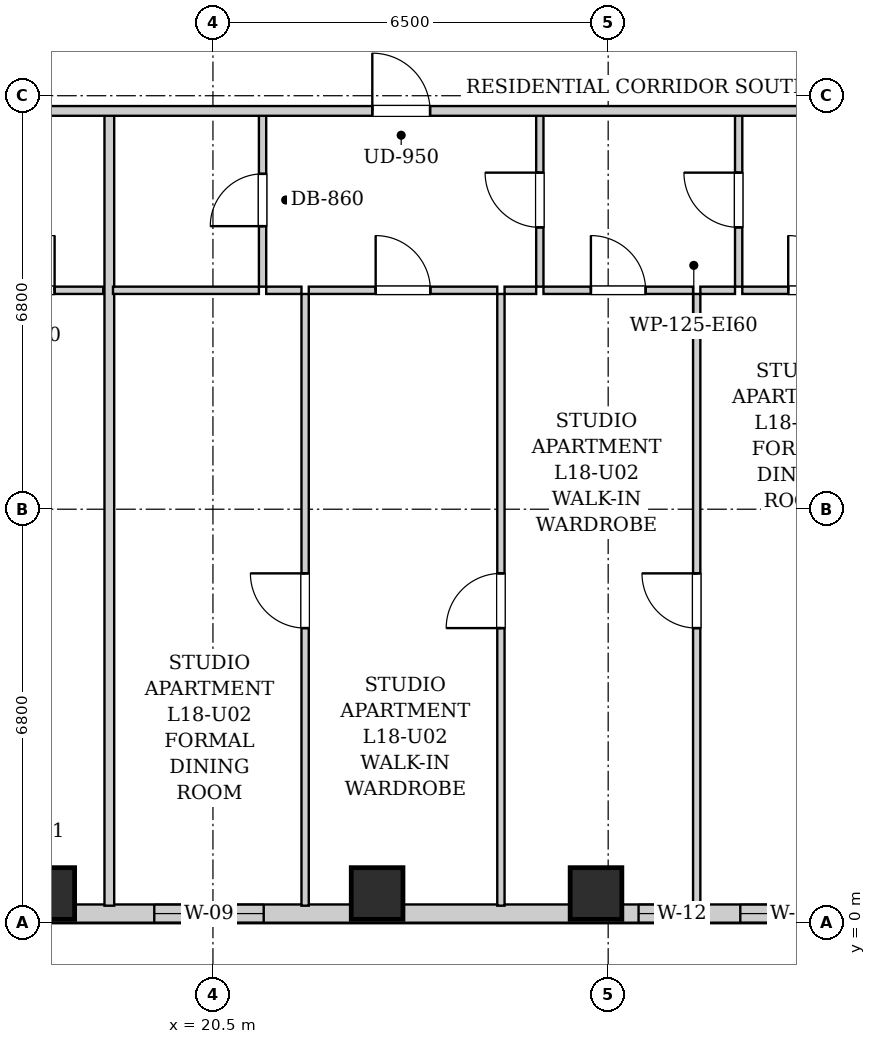
"""IFC4 building model, lengths in metres.
Left out: names, types, materials, properties, quantities, classifications, styles, units other than length and angle.
Written with IfcOpenShell. Run it as: python <this file> out.ifc"""

import sys

from ifc_helpers import new_model, si_unit, direction, frame, frame_2d, origin, origin_2d, place, context, subcontext, project, spatial, rectangle, extrude, element, fill, save


model = new_model("IFC4")
c1 = context("Model", 3, precision=1e-05, world=origin(), true_north=direction((0.0, 1.0)))
c2 = subcontext(c1, "Body", "Model", "MODEL_VIEW")
j1 = project(units=[si_unit("LENGTHUNIT", "METRE"), si_unit("PLANEANGLEUNIT", "RADIAN")], contexts=[c1])
p1 = place(None, origin())
s1 = spatial("IfcSite", under=j1, at=p1, CompositionType="ELEMENT")
p2 = place(p1, origin())
s2 = spatial("IfcBuilding", under=s1, at=p2, CompositionType="ELEMENT")
p3 = place(p2, frame((0.0, 0.0, 67.4)))
s3 = spatial("IfcBuildingStorey", under=s2, at=p3, CompositionType="ELEMENT", Elevation=67.4)
for number, where, z_axis, x_axis in (
    (1, (17.8, 0.48, 0.0), (0.0, 0.0, 1.0), (1.0, 0.0, 0.0)),
    (2, (23.2, 0.48, 0.0), (0.0, 0.0, 1.0), (1.0, 0.0, 0.0)),
    (3, (26.8, 0.48, 0.0), (0.0, 0.0, 1.0), (1.0, 0.0, 0.0)),
):
    element("IfcColumn", number, at=place(p3, frame(where, z_axis=z_axis, x_axis=x_axis)), inside=s3, PredefinedType="COLUMN", context=c2, shape_type="SweptSolid", body=[
        extrude(rectangle(XDim=0.85, YDim=0.85, at=origin_2d()), origin(), (0.0, 0.0, 1.0), 3.2),
    ])
p4 = place(p3, frame((44.0, 0.15, 0.0), z_axis=(0.0, 0.0, 1.0), x_axis=(-1.0, 0.0, 0.0)))
e4 = element("IfcWall", 4, at=p4, inside=s3, PredefinedType="SOLIDWALL", context=c2, shape_type="SweptSolid", body=[
    extrude(rectangle(XDim=26.35, YDim=0.3, at=frame_2d((13.175, 0.0))), origin(), (0.0, 0.0, 1.0), 1.915),
])
p5 = place(p4, frame((22.665, 0.0, 0.55)))
e5 = element("IfcOpeningElement", 5, at=p5, cuts=e4, PredefinedType="OPENING", context=c2, shape_type="SweptSolid", body=[
    extrude(rectangle(XDim=1.8, YDim=1.2, at=frame_2d((0.9, 0.6))), frame((0.0, 0.16, 0.0), z_axis=(0.0, -1.0, 0.0), x_axis=(1.0, 0.0, 0.0)), (0.0, 0.0, 1.0), 0.32),
])
p6 = place(p4, frame((15.82, 0.0, 0.55)))
e6 = element("IfcOpeningElement", 6, at=p6, cuts=e4, PredefinedType="OPENING", context=c2, shape_type="SweptSolid", body=[
    extrude(rectangle(XDim=0.68, YDim=1.2, at=frame_2d((0.34, 0.6))), frame((0.0, 0.16, 0.0), z_axis=(0.0, -1.0, 0.0), x_axis=(1.0, 0.0, 0.0)), (0.0, 0.0, 1.0), 0.32),
])
p7 = place(p4, frame((13.027, 0.0, 0.55)))
e7 = element("IfcOpeningElement", 7, at=p7, cuts=e4, PredefinedType="OPENING", context=c2, shape_type="SweptSolid", body=[
    extrude(rectangle(XDim=1.8, YDim=1.2, at=frame_2d((0.9, 0.6))), frame((0.0, 0.16, 0.0), z_axis=(0.0, -1.0, 0.0), x_axis=(1.0, 0.0, 0.0)), (0.0, 0.0, 1.0), 0.32),
])
p8 = place(p4, frame((9.365, 0.0, 0.55)))
e8 = element("IfcOpeningElement", 8, at=p8, cuts=e4, PredefinedType="OPENING", context=c2, shape_type="SweptSolid", body=[
    extrude(rectangle(XDim=0.85, YDim=1.2, at=frame_2d((0.425, 0.6))), frame((0.0, 0.16, 0.0), z_axis=(0.0, -1.0, 0.0), x_axis=(1.0, 0.0, 0.0)), (0.0, 0.0, 1.0), 0.32),
])
p9 = place(p4, frame((6.553, 0.0, 0.55)))
e9 = element("IfcOpeningElement", 9, at=p9, cuts=e4, PredefinedType="OPENING", context=c2, shape_type="SweptSolid", body=[
    extrude(rectangle(XDim=1.8, YDim=1.2, at=frame_2d((0.9, 0.6))), frame((0.0, 0.16, 0.0), z_axis=(0.0, -1.0, 0.0), x_axis=(1.0, 0.0, 0.0)), (0.0, 0.0, 1.0), 0.32),
])
p10 = place(p4, frame((2.262, 0.0, 0.55)))
e10 = element("IfcOpeningElement", 10, at=p10, cuts=e4, PredefinedType="OPENING", context=c2, shape_type="SweptSolid", body=[
    extrude(rectangle(XDim=1.8, YDim=1.2, at=frame_2d((0.9, 0.6))), frame((0.0, 0.16, 0.0), z_axis=(0.0, -1.0, 0.0), x_axis=(1.0, 0.0, 0.0)), (0.0, 0.0, 1.0), 0.32),
])
p11 = place(p3, frame((16.196, 10.4, 0.0), z_axis=(0.0, 0.0, 1.0), x_axis=(1.0, 0.0, 0.0)))
e11 = element("IfcWall", 11, at=p11, inside=s3, PredefinedType="PARTITIONING", context=c2, shape_type="SweptSolid", body=[
    extrude(rectangle(XDim=2.5, YDim=0.12, at=frame_2d((1.25, 0.0))), origin(), (0.0, 0.0, 1.0), 2.88),
])
p12 = place(p11, frame((0.8, 0.0, 0.0)))
e12 = element("IfcOpeningElement", 12, at=p12, cuts=e11, PredefinedType="OPENING", context=c2, shape_type="SweptSolid", body=[
    extrude(rectangle(XDim=0.9, YDim=2.05, at=frame_2d((0.45, 1.025))), frame((0.0, 0.07, 0.0), z_axis=(0.0, -1.0, 0.0), x_axis=(1.0, 0.0, 0.0)), (0.0, 0.0, 1.0), 0.14),
])
p13 = place(p3, frame((18.796, 0.28, 0.0), z_axis=(0.0, 0.0, 1.0), x_axis=(0.0, 1.0, 0.0)))
e13 = element("IfcWall", 13, at=p13, inside=s3, PredefinedType="PARTITIONING", context=c2, shape_type="SweptSolid", body=[
    extrude(rectangle(XDim=13.03, YDim=0.16, at=frame_2d((6.515, 0.0))), origin(), (0.0, 0.0, 1.0), 2.88),
])
p14 = place(p3, frame((21.316, 10.46, 0.0), z_axis=(0.0, 0.0, 1.0), x_axis=(0.0, 1.0, 0.0)))
e14 = element("IfcWall", 14, at=p14, inside=s3, PredefinedType="PARTITIONING", context=c2, shape_type="SweptSolid", body=[
    extrude(rectangle(XDim=2.85, YDim=0.12, at=frame_2d((1.425, 0.0))), origin(), (0.0, 0.0, 1.0), 2.88),
])
p15 = place(p14, frame((0.995, 0.0, 0.0)))
e15 = element("IfcOpeningElement", 15, at=p15, cuts=e14, PredefinedType="OPENING", context=c2, shape_type="SweptSolid", body=[
    extrude(rectangle(XDim=0.86, YDim=2.05, at=frame_2d((0.43, 1.025))), frame((0.0, 0.07, 0.0), z_axis=(0.0, -1.0, 0.0), x_axis=(1.0, 0.0, 0.0)), (0.0, 0.0, 1.0), 0.14),
])
p16 = place(p3, frame((18.856, 10.4, 0.0), z_axis=(0.0, 0.0, 1.0), x_axis=(1.0, 0.0, 0.0)))
e16 = element("IfcWall", 16, at=p16, inside=s3, PredefinedType="PARTITIONING", context=c2, shape_type="SweptSolid", body=[
    extrude(rectangle(XDim=2.4, YDim=0.12, at=frame_2d((1.2, 0.0))), origin(), (0.0, 0.0, 1.0), 2.88),
])
p17 = place(p3, frame((25.876, 10.46, 0.0), z_axis=(0.0, 0.0, 1.0), x_axis=(0.0, 1.0, 0.0)))
e17 = element("IfcWall", 17, at=p17, inside=s3, PredefinedType="PARTITIONING", context=c2, shape_type="SweptSolid", body=[
    extrude(rectangle(XDim=2.85, YDim=0.12, at=frame_2d((1.425, 0.0))), origin(), (0.0, 0.0, 1.0), 2.88),
])
p18 = place(p17, frame((0.975, 0.0, 0.0)))
e18 = element("IfcOpeningElement", 18, at=p18, cuts=e17, PredefinedType="OPENING", context=c2, shape_type="SweptSolid", body=[
    extrude(rectangle(XDim=0.9, YDim=2.05, at=frame_2d((0.45, 1.025))), frame((0.0, 0.07, 0.0), z_axis=(0.0, -1.0, 0.0), x_axis=(1.0, 0.0, 0.0)), (0.0, 0.0, 1.0), 0.14),
])
p19 = place(p3, frame((21.376, 10.4, 0.0), z_axis=(0.0, 0.0, 1.0), x_axis=(1.0, 0.0, 0.0)))
e19 = element("IfcWall", 19, at=p19, inside=s3, PredefinedType="PARTITIONING", context=c2, shape_type="SweptSolid", body=[
    extrude(rectangle(XDim=0.58, YDim=0.12, at=frame_2d((0.29, 0.0))), origin(), (0.0, 0.0, 1.0), 2.88),
])
p20 = place(p3, frame((22.076, 10.4, 0.0), z_axis=(0.0, 0.0, 1.0), x_axis=(1.0, 0.0, 0.0)))
e20 = element("IfcWall", 20, at=p20, inside=s3, PredefinedType="PARTITIONING", context=c2, shape_type="SweptSolid", body=[
    extrude(rectangle(XDim=3.1, YDim=0.12, at=frame_2d((1.55, 0.0))), origin(), (0.0, 0.0, 1.0), 2.88),
])
p21 = place(p20, frame((1.1, 0.0, 0.0)))
e21 = element("IfcOpeningElement", 21, at=p21, cuts=e20, PredefinedType="OPENING", context=c2, shape_type="SweptSolid", body=[
    extrude(rectangle(XDim=0.9, YDim=2.05, at=frame_2d((0.45, 1.025))), frame((0.0, 0.07, 0.0), z_axis=(0.0, -1.0, 0.0), x_axis=(1.0, 0.0, 0.0)), (0.0, 0.0, 1.0), 0.14),
])
p22 = place(p3, frame((25.296, 10.4, 0.0), z_axis=(0.0, 0.0, 1.0), x_axis=(1.0, 0.0, 0.0)))
e22 = element("IfcWall", 22, at=p22, inside=s3, PredefinedType="PARTITIONING", context=c2, shape_type="SweptSolid", body=[
    extrude(rectangle(XDim=0.52, YDim=0.12, at=frame_2d((0.26, 0.0))), origin(), (0.0, 0.0, 1.0), 2.88),
])
p23 = place(p3, frame((29.146, 10.46, 0.0), z_axis=(0.0, 0.0, 1.0), x_axis=(0.0, 1.0, 0.0)))
e23 = element("IfcWall", 23, at=p23, inside=s3, PredefinedType="PARTITIONING", context=c2, shape_type="SweptSolid", body=[
    extrude(rectangle(XDim=2.85, YDim=0.12, at=frame_2d((1.425, 0.0))), origin(), (0.0, 0.0, 1.0), 2.88),
])
p24 = place(p23, frame((0.975, 0.0, 0.0)))
e24 = element("IfcOpeningElement", 24, at=p24, cuts=e23, PredefinedType="OPENING", context=c2, shape_type="SweptSolid", body=[
    extrude(rectangle(XDim=0.9, YDim=2.05, at=frame_2d((0.45, 1.025))), frame((0.0, 0.07, 0.0), z_axis=(0.0, -1.0, 0.0), x_axis=(1.0, 0.0, 0.0)), (0.0, 0.0, 1.0), 0.14),
])
p25 = place(p3, frame((25.936, 10.4, 0.0), z_axis=(0.0, 0.0, 1.0), x_axis=(1.0, 0.0, 0.0)))
e25 = element("IfcWall", 25, at=p25, inside=s3, PredefinedType="PARTITIONING", context=c2, shape_type="SweptSolid", body=[
    extrude(rectangle(XDim=2.46, YDim=0.12, at=frame_2d((1.23, 0.0))), origin(), (0.0, 0.0, 1.0), 2.88),
])
p26 = place(p25, frame((0.78, 0.0, 0.0)))
e26 = element("IfcOpeningElement", 26, at=p26, cuts=e25, PredefinedType="OPENING", context=c2, shape_type="SweptSolid", body=[
    extrude(rectangle(XDim=0.9, YDim=2.05, at=frame_2d((0.45, 1.025))), frame((0.0, 0.07, 0.0), z_axis=(0.0, -1.0, 0.0), x_axis=(1.0, 0.0, 0.0)), (0.0, 0.0, 1.0), 0.14),
])
p27 = place(p3, frame((28.516, 10.4, 0.0), z_axis=(0.0, 0.0, 1.0), x_axis=(1.0, 0.0, 0.0)))
e27 = element("IfcWall", 27, at=p27, inside=s3, PredefinedType="PARTITIONING", context=c2, shape_type="SweptSolid", body=[
    extrude(rectangle(XDim=0.57, YDim=0.12, at=frame_2d((0.285, 0.0))), origin(), (0.0, 0.0, 1.0), 2.88),
])
p28 = place(p3, frame((29.206, 10.4, 0.0), z_axis=(0.0, 0.0, 1.0), x_axis=(1.0, 0.0, 0.0)))
e28 = element("IfcWall", 28, at=p28, inside=s3, PredefinedType="PARTITIONING", context=c2, shape_type="SweptSolid", body=[
    extrude(rectangle(XDim=2.41, YDim=0.12, at=frame_2d((1.205, 0.0))), origin(), (0.0, 0.0, 1.0), 2.88),
])
p29 = place(p28, frame((0.755, 0.0, 0.0)))
e29 = element("IfcOpeningElement", 29, at=p29, cuts=e28, PredefinedType="OPENING", context=c2, shape_type="SweptSolid", body=[
    extrude(rectangle(XDim=0.9, YDim=2.05, at=frame_2d((0.45, 1.025))), frame((0.0, 0.07, 0.0), z_axis=(0.0, -1.0, 0.0), x_axis=(1.0, 0.0, 0.0)), (0.0, 0.0, 1.0), 0.14),
])
p30 = place(p3, frame((22.016, 0.28, 0.0), z_axis=(0.0, 0.0, 1.0), x_axis=(0.0, 1.0, 0.0)))
e30 = element("IfcWall", 30, at=p30, inside=s3, PredefinedType="PARTITIONING", context=c2, shape_type="SweptSolid", body=[
    extrude(rectangle(XDim=10.06, YDim=0.12, at=frame_2d((5.03, 0.0))), origin(), (0.0, 0.0, 1.0), 2.88),
])
p31 = place(p30, frame((4.565, 0.0, 0.0)))
e31 = element("IfcOpeningElement", 31, at=p31, cuts=e30, PredefinedType="OPENING", context=c2, shape_type="SweptSolid", body=[
    extrude(rectangle(XDim=0.9, YDim=2.05, at=frame_2d((0.45, 1.025))), frame((0.0, 0.07, 0.0), z_axis=(0.0, -1.0, 0.0), x_axis=(1.0, 0.0, 0.0)), (0.0, 0.0, 1.0), 0.14),
])
p32 = place(p3, frame((25.236, 0.28, 0.0), z_axis=(0.0, 0.0, 1.0), x_axis=(0.0, 1.0, 0.0)))
e32 = element("IfcWall", 32, at=p32, inside=s3, PredefinedType="PARTITIONING", context=c2, shape_type="SweptSolid", body=[
    extrude(rectangle(XDim=10.06, YDim=0.12, at=frame_2d((5.03, 0.0))), origin(), (0.0, 0.0, 1.0), 2.88),
])
p33 = place(p32, frame((4.565, 0.0, 0.0)))
e33 = element("IfcOpeningElement", 33, at=p33, cuts=e32, PredefinedType="OPENING", context=c2, shape_type="SweptSolid", body=[
    extrude(rectangle(XDim=0.9, YDim=2.05, at=frame_2d((0.45, 1.025))), frame((0.0, 0.07, 0.0), z_axis=(0.0, -1.0, 0.0), x_axis=(1.0, 0.0, 0.0)), (0.0, 0.0, 1.0), 0.14),
])
p34 = place(p3, frame((28.456, 0.28, 0.0), z_axis=(0.0, 0.0, 1.0), x_axis=(0.0, 1.0, 0.0)))
e34 = element("IfcWall", 34, at=p34, inside=s3, PredefinedType="PARTITIONING", context=c2, shape_type="SweptSolid", body=[
    extrude(rectangle(XDim=10.06, YDim=0.12, at=frame_2d((5.03, 0.0))), origin(), (0.0, 0.0, 1.0), 2.88),
])
p35 = place(p34, frame((4.565, 0.0, 0.0)))
e35 = element("IfcOpeningElement", 35, at=p35, cuts=e34, PredefinedType="OPENING", context=c2, shape_type="SweptSolid", body=[
    extrude(rectangle(XDim=0.9, YDim=2.05, at=frame_2d((0.45, 1.025))), frame((0.0, 0.07, 0.0), z_axis=(0.0, -1.0, 0.0), x_axis=(1.0, 0.0, 0.0)), (0.0, 0.0, 1.0), 0.14),
])
p36 = place(p3, frame((10.05, 13.35, 0.0), z_axis=(0.0, 0.0, 1.0), x_axis=(1.0, 0.0, 0.0)))
e36 = element("IfcWall", 36, at=p36, inside=s3, PredefinedType="PARTITIONING", context=c2, shape_type="SweptSolid", body=[
    extrude(rectangle(XDim=33.9, YDim=0.16, at=frame_2d((16.95, 0.0))), origin(), (0.0, 0.0, 1.0), 2.88),
])
p37 = place(p36, frame((3.8, 0.0, 0.0)))
e37 = element("IfcOpeningElement", 37, at=p37, cuts=e36, PredefinedType="OPENING", context=c2, shape_type="SweptSolid", body=[
    extrude(rectangle(XDim=0.95, YDim=2.1, at=frame_2d((0.475, 1.05))), frame((0.0, 0.09, 0.0), z_axis=(0.0, -1.0, 0.0), x_axis=(1.0, 0.0, 0.0)), (0.0, 0.0, 1.0), 0.18),
])
p38 = place(p36, frame((13.071, 0.0, 0.0)))
e38 = element("IfcOpeningElement", 38, at=p38, cuts=e36, PredefinedType="OPENING", context=c2, shape_type="SweptSolid", body=[
    extrude(rectangle(XDim=0.95, YDim=2.1, at=frame_2d((0.475, 1.05))), frame((0.0, 0.09, 0.0), z_axis=(0.0, -1.0, 0.0), x_axis=(1.0, 0.0, 0.0)), (0.0, 0.0, 1.0), 0.18),
])
p39 = place(p12, origin())
e39 = element("IfcDoor", 39, at=p39, inside=s3, OperationType="SINGLE_SWING_RIGHT", PredefinedType="DOOR", context=c2, shape_type="SweptSolid", body=[
    extrude(rectangle(XDim=0.9, YDim=2.05, at=frame_2d((0.45, 1.025))), frame((0.0, 0.025, 0.0), z_axis=(0.0, -1.0, 0.0), x_axis=(1.0, 0.0, 0.0)), (0.0, 0.0, 1.0), 0.05),
])
fill(e12, e39)
p40 = place(p15, origin())
e40 = element("IfcDoor", 40, at=p40, inside=s3, OperationType="SINGLE_SWING_LEFT", PredefinedType="DOOR", context=c2, shape_type="SweptSolid", body=[
    extrude(rectangle(XDim=0.86, YDim=2.05, at=frame_2d((0.43, 1.025))), frame((0.0, 0.025, 0.0), z_axis=(0.0, -1.0, 0.0), x_axis=(1.0, 0.0, 0.0)), (0.0, 0.0, 1.0), 0.05),
])
fill(e15, e40)
p41 = place(p18, origin())
e41 = element("IfcDoor", 41, at=p41, inside=s3, OperationType="SINGLE_SWING_RIGHT", PredefinedType="DOOR", context=c2, shape_type="SweptSolid", body=[
    extrude(rectangle(XDim=0.9, YDim=2.05, at=frame_2d((0.45, 1.025))), frame((0.0, 0.025, 0.0), z_axis=(0.0, -1.0, 0.0), x_axis=(1.0, 0.0, 0.0)), (0.0, 0.0, 1.0), 0.05),
])
fill(e18, e41)
p42 = place(p21, origin())
e42 = element("IfcDoor", 42, at=p42, inside=s3, OperationType="SINGLE_SWING_LEFT", PredefinedType="DOOR", context=c2, shape_type="SweptSolid", body=[
    extrude(rectangle(XDim=0.9, YDim=2.05, at=frame_2d((0.45, 1.025))), frame((0.0, 0.025, 0.0), z_axis=(0.0, -1.0, 0.0), x_axis=(1.0, 0.0, 0.0)), (0.0, 0.0, 1.0), 0.05),
])
fill(e21, e42)
p43 = place(p24, origin())
e43 = element("IfcDoor", 43, at=p43, inside=s3, OperationType="SINGLE_SWING_RIGHT", PredefinedType="DOOR", context=c2, shape_type="SweptSolid", body=[
    extrude(rectangle(XDim=0.9, YDim=2.05, at=frame_2d((0.45, 1.025))), frame((0.0, 0.025, 0.0), z_axis=(0.0, -1.0, 0.0), x_axis=(1.0, 0.0, 0.0)), (0.0, 0.0, 1.0), 0.05),
])
fill(e24, e43)
p44 = place(p26, origin())
e44 = element("IfcDoor", 44, at=p44, inside=s3, OperationType="SINGLE_SWING_LEFT", PredefinedType="DOOR", context=c2, shape_type="SweptSolid", body=[
    extrude(rectangle(XDim=0.9, YDim=2.05, at=frame_2d((0.45, 1.025))), frame((0.0, 0.025, 0.0), z_axis=(0.0, -1.0, 0.0), x_axis=(1.0, 0.0, 0.0)), (0.0, 0.0, 1.0), 0.05),
])
fill(e26, e44)
p45 = place(p29, origin())
e45 = element("IfcDoor", 45, at=p45, inside=s3, OperationType="SINGLE_SWING_LEFT", PredefinedType="DOOR", context=c2, shape_type="SweptSolid", body=[
    extrude(rectangle(XDim=0.9, YDim=2.05, at=frame_2d((0.45, 1.025))), frame((0.0, 0.025, 0.0), z_axis=(0.0, -1.0, 0.0), x_axis=(1.0, 0.0, 0.0)), (0.0, 0.0, 1.0), 0.05),
])
fill(e29, e45)
p46 = place(p31, origin())
e46 = element("IfcDoor", 46, at=p46, inside=s3, OperationType="SINGLE_SWING_RIGHT", PredefinedType="DOOR", context=c2, shape_type="SweptSolid", body=[
    extrude(rectangle(XDim=0.9, YDim=2.05, at=frame_2d((0.45, 1.025))), frame((0.0, 0.025, 0.0), z_axis=(0.0, -1.0, 0.0), x_axis=(1.0, 0.0, 0.0)), (0.0, 0.0, 1.0), 0.05),
])
fill(e31, e46)
p47 = place(p33, origin())
e47 = element("IfcDoor", 47, at=p47, inside=s3, OperationType="SINGLE_SWING_LEFT", PredefinedType="DOOR", context=c2, shape_type="SweptSolid", body=[
    extrude(rectangle(XDim=0.9, YDim=2.05, at=frame_2d((0.45, 1.025))), frame((0.0, 0.025, 0.0), z_axis=(0.0, -1.0, 0.0), x_axis=(1.0, 0.0, 0.0)), (0.0, 0.0, 1.0), 0.05),
])
fill(e33, e47)
p48 = place(p35, origin())
e48 = element("IfcDoor", 48, at=p48, inside=s3, OperationType="SINGLE_SWING_RIGHT", PredefinedType="DOOR", context=c2, shape_type="SweptSolid", body=[
    extrude(rectangle(XDim=0.9, YDim=2.05, at=frame_2d((0.45, 1.025))), frame((0.0, 0.025, 0.0), z_axis=(0.0, -1.0, 0.0), x_axis=(1.0, 0.0, 0.0)), (0.0, 0.0, 1.0), 0.05),
])
fill(e35, e48)
p49 = place(p38, origin())
e49 = element("IfcDoor", 49, at=p49, inside=s3, OperationType="SINGLE_SWING_LEFT", PredefinedType="DOOR", context=c2, shape_type="SweptSolid", body=[
    extrude(rectangle(XDim=0.95, YDim=2.1, at=frame_2d((0.475, 1.05))), frame((0.0, 0.025, 0.0), z_axis=(0.0, -1.0, 0.0), x_axis=(1.0, 0.0, 0.0)), (0.0, 0.0, 1.0), 0.05),
])
fill(e38, e49)
p50 = place(p5, origin())
e50 = element("IfcWindow", 50, at=p50, inside=s3, PartitioningType="DOUBLE_PANEL_VERTICAL", PredefinedType="WINDOW", context=c2, shape_type="SweptSolid", body=[
    extrude(rectangle(XDim=1.8, YDim=1.2, at=frame_2d((0.9, 0.6))), frame((0.0, 0.03, 0.0), z_axis=(0.0, -1.0, 0.0), x_axis=(1.0, 0.0, 0.0)), (0.0, 0.0, 1.0), 0.06),
])
fill(e5, e50)
p51 = place(p6, origin())
e51 = element("IfcWindow", 51, at=p51, inside=s3, PartitioningType="SINGLE_PANEL", PredefinedType="WINDOW", context=c2, shape_type="SweptSolid", body=[
    extrude(rectangle(XDim=0.68, YDim=1.2, at=frame_2d((0.34, 0.6))), frame((0.0, 0.03, 0.0), z_axis=(0.0, -1.0, 0.0), x_axis=(1.0, 0.0, 0.0)), (0.0, 0.0, 1.0), 0.06),
])
fill(e6, e51)
p52 = place(p7, origin())
e52 = element("IfcWindow", 52, at=p52, inside=s3, PartitioningType="DOUBLE_PANEL_VERTICAL", PredefinedType="WINDOW", context=c2, shape_type="SweptSolid", body=[
    extrude(rectangle(XDim=1.8, YDim=1.2, at=frame_2d((0.9, 0.6))), frame((0.0, 0.03, 0.0), z_axis=(0.0, -1.0, 0.0), x_axis=(1.0, 0.0, 0.0)), (0.0, 0.0, 1.0), 0.06),
])
fill(e7, e52)
save(model, sys.argv[1])
